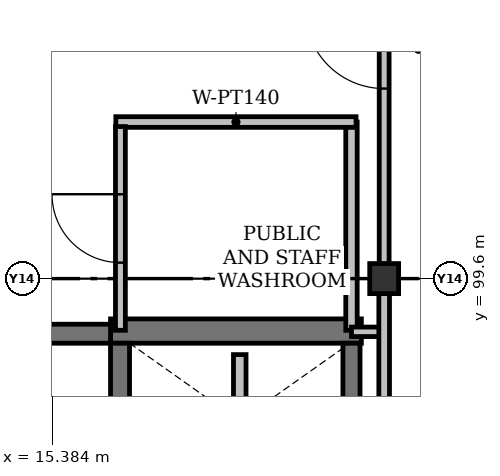
"""IFC4 building model, lengths in metres.
Left out: names, types, materials, properties, quantities, classifications, styles, units other than length and angle.
Written with IfcOpenShell. Run it as: python <this file> out.ifc"""

import sys

from ifc_helpers import new_model, si_unit, direction, frame, frame_2d, origin, origin_2d, place, context, subcontext, project, spatial, rectangle, i_section, extrude, element, fill, save


model = new_model("IFC4")
c1 = context("Model", 3, precision=1e-05, world=origin(), true_north=direction((0.0, 1.0)))
c2 = subcontext(c1, "Body", "Model", "MODEL_VIEW")
j1 = project(units=[si_unit("LENGTHUNIT", "METRE"), si_unit("PLANEANGLEUNIT", "RADIAN")], contexts=[c1])
p1 = place(None, origin())
s1 = spatial("IfcSite", under=j1, at=p1, CompositionType="ELEMENT")
p2 = place(p1, origin())
s2 = spatial("IfcBuilding", under=s1, at=p2, CompositionType="ELEMENT")
p3 = place(p2, frame((0.0, 0.0, 18.3)))
s3 = spatial("IfcBuildingStorey", under=s2, at=p3, CompositionType="ELEMENT", Elevation=18.3)
p4 = place(p3, frame((19.75, 99.6, 0.0), z_axis=(0.0, 0.0, 1.0), x_axis=(0.0, 1.0, 0.0)))
e1 = element("IfcColumn", 1, at=p4, inside=s3, PredefinedType="COLUMN", context=c2, shape_type="SweptSolid", body=[
    extrude(i_section(OverallWidth=0.395, OverallDepth=0.38, WebThickness=0.019, FlangeThickness=0.03, FilletRadius=0.015, at=origin_2d()), origin(), (0.0, 0.0, 1.0), 4.2),
])
p5 = place(p3, frame((16.15, 98.91, 0.0), z_axis=(0.0, 0.0, 1.0), x_axis=(1.0, 0.0, 0.0)))
e2 = element("IfcWall", 2, at=p5, inside=s3, PredefinedType="SHEAR", context=c2, shape_type="SweptSolid", body=[
    extrude(rectangle(XDim=3.3, YDim=0.32, at=frame_2d((1.65, 0.0))), origin(), (0.0, 0.0, 1.0), 4.2),
])
p6 = place(p3, frame((12.12, 98.875, 0.0), z_axis=(0.0, 0.0, 1.0), x_axis=(1.0, 0.0, 0.0)))
e3 = element("IfcWall", 3, at=p6, inside=s3, PredefinedType="SHEAR", context=c2, shape_type="SweptSolid", body=[
    extrude(rectangle(XDim=4.03, YDim=0.25, at=frame_2d((2.015, 0.0))), origin(), (0.0, 0.0, 1.0), 4.2),
])
p7 = place(p6, frame((1.35, 0.0, 0.0)))
e4 = element("IfcOpeningElement", 4, at=p7, cuts=e3, PredefinedType="OPENING", context=c2, shape_type="SweptSolid", body=[
    extrude(rectangle(XDim=1.3, YDim=2.2, at=frame_2d((0.65, 1.1))), frame((0.0, 0.125, 0.0), z_axis=(0.0, -1.0, 0.0), x_axis=(1.0, 0.0, 0.0)), (0.0, 0.0, 1.0), 0.25),
])
p8 = place(p3, frame((19.32, 84.8, 0.0), z_axis=(0.0, 0.0, 1.0), x_axis=(0.0, 1.0, 0.0)))
e5 = element("IfcWall", 5, at=p8, inside=s3, PredefinedType="SHEAR", context=c2, shape_type="SweptSolid", body=[
    extrude(rectangle(XDim=13.95, YDim=0.225, at=frame_2d((6.975, 0.0))), origin(), (0.0, 0.0, 1.0), 4.2),
])
p9 = place(p3, frame((16.275, 96.575, 0.0), z_axis=(0.0, 0.0, 1.0), x_axis=(0.0, 1.0, 0.0)))
e6 = element("IfcWall", 6, at=p9, inside=s3, PredefinedType="SHEAR", context=c2, shape_type="SweptSolid", body=[
    extrude(rectangle(XDim=2.175, YDim=0.25, at=frame_2d((1.087, 0.0))), origin(), (0.0, 0.0, 1.0), 4.2),
])
p10 = place(p3, frame((17.85, 96.8, 0.0), z_axis=(0.0, 0.0, 1.0), x_axis=(0.0, 1.0, 0.0)))
e7 = element("IfcWall", 7, at=p10, inside=s3, PredefinedType="PLUMBINGWALL", context=c2, shape_type="SweptSolid", body=[
    extrude(rectangle(XDim=1.8, YDim=0.165, at=frame_2d((0.9, 0.0))), origin(), (0.0, 0.0, 1.0), 4.2),
])
p11 = place(p3, frame((19.32, 98.92, 0.0), z_axis=(0.0, 0.0, 1.0), x_axis=(0.0, 1.0, 0.0)))
e8 = element("IfcWall", 8, at=p11, inside=s3, PredefinedType="PARTITIONING", context=c2, shape_type="SweptSolid", body=[
    extrude(rectangle(XDim=2.74, YDim=0.15, at=frame_2d((1.37, 0.0))), origin(), (0.0, 0.0, 1.0), 3.451),
])
p12 = place(p3, frame((19.38, 101.66, 0.0), z_axis=(0.0, 0.0, 1.0), x_axis=(-1.0, 0.0, 0.0)))
e9 = element("IfcWall", 9, at=p12, inside=s3, PredefinedType="PARTITIONING", context=c2, shape_type="SweptSolid", body=[
    extrude(rectangle(XDim=3.16, YDim=0.14, at=frame_2d((1.58, 0.0))), origin(), (0.0, 0.0, 1.0), 3.95),
])
p13 = place(p3, frame((16.28, 98.92, 0.0), z_axis=(0.0, 0.0, 1.0), x_axis=(0.0, 1.0, 0.0)))
e10 = element("IfcWall", 10, at=p13, inside=s3, PredefinedType="PARTITIONING", context=c2, shape_type="SweptSolid", body=[
    extrude(rectangle(XDim=2.68, YDim=0.13, at=frame_2d((1.34, 0.0))), origin(), (0.0, 0.0, 1.0), 3.451),
])
p14 = place(p13, frame((0.89, 0.0, 0.0)))
e11 = element("IfcOpeningElement", 11, at=p14, cuts=e10, PredefinedType="OPENING", context=c2, shape_type="SweptSolid", body=[
    extrude(rectangle(XDim=0.9, YDim=2.08, at=frame_2d((0.45, 1.04))), frame((0.0, 0.065, 0.0), z_axis=(0.0, -1.0, 0.0), x_axis=(1.0, 0.0, 0.0)), (0.0, 0.0, 1.0), 0.13),
])
p15 = place(p3, frame((19.75, 98.9, 0.0), z_axis=(0.0, 0.0, 1.0), x_axis=(-1.0, 0.0, 0.0)))
e12 = element("IfcWall", 12, at=p15, inside=s3, PredefinedType="PARTITIONING", context=c2, shape_type="SweptSolid", body=[
    extrude(rectangle(XDim=0.43, YDim=0.125, at=frame_2d((0.215, 0.0))), origin(), (0.0, 0.0, 1.0), 3.527),
])
p16 = place(p3, frame((19.75, 92.585, 0.0), z_axis=(0.0, 0.0, 1.0), x_axis=(0.0, 1.0, 0.0)))
e13 = element("IfcWall", 13, at=p16, inside=s3, PredefinedType="PARTITIONING", context=c2, shape_type="SweptSolid", body=[
    extrude(rectangle(XDim=6.823, YDim=0.14, at=frame_2d((3.411, 0.0))), origin(), (0.0, 0.0, 1.0), 3.527),
])
p17 = place(p3, frame((19.75, 99.792, 0.0), z_axis=(0.0, 0.0, 1.0), x_axis=(0.0, 1.0, 0.0)))
e14 = element("IfcWall", 14, at=p17, inside=s3, PredefinedType="PARTITIONING", context=c2, shape_type="SweptSolid", body=[
    extrude(rectangle(XDim=3.808, YDim=0.13, at=frame_2d((1.904, 0.0))), origin(), (0.0, 0.0, 1.0), 3.527),
])
p18 = place(p17, frame((2.308, 0.0, 0.0)))
e15 = element("IfcOpeningElement", 15, at=p18, cuts=e14, PredefinedType="OPENING", context=c2, shape_type="SweptSolid", body=[
    extrude(rectangle(XDim=1.04, YDim=2.15, at=frame_2d((0.52, 1.075))), frame((0.0, 0.065, 0.0), z_axis=(0.0, -1.0, 0.0), x_axis=(1.0, 0.0, 0.0)), (0.0, 0.0, 1.0), 0.13),
])
p19 = place(p14, origin())
e16 = element("IfcDoor", 16, at=p19, inside=s3, OperationType="SINGLE_SWING_RIGHT", PredefinedType="DOOR", context=c2, shape_type="SweptSolid", body=[
    extrude(rectangle(XDim=0.9, YDim=2.08, at=frame_2d((0.45, 1.04))), frame((0.0, 0.025, 0.0), z_axis=(0.0, -1.0, 0.0), x_axis=(1.0, 0.0, 0.0)), (0.0, 0.0, 1.0), 0.05),
])
fill(e11, e16)
p20 = place(p18, origin())
e17 = element("IfcDoor", 17, at=p20, inside=s3, OperationType="SINGLE_SWING_RIGHT", PredefinedType="DOOR", context=c2, shape_type="SweptSolid", body=[
    extrude(rectangle(XDim=1.04, YDim=2.15, at=frame_2d((0.52, 1.075))), frame((0.0, 0.025, 0.0), z_axis=(0.0, -1.0, 0.0), x_axis=(1.0, 0.0, 0.0)), (0.0, 0.0, 1.0), 0.05),
])
fill(e15, e17)
save(model, sys.argv[1])
